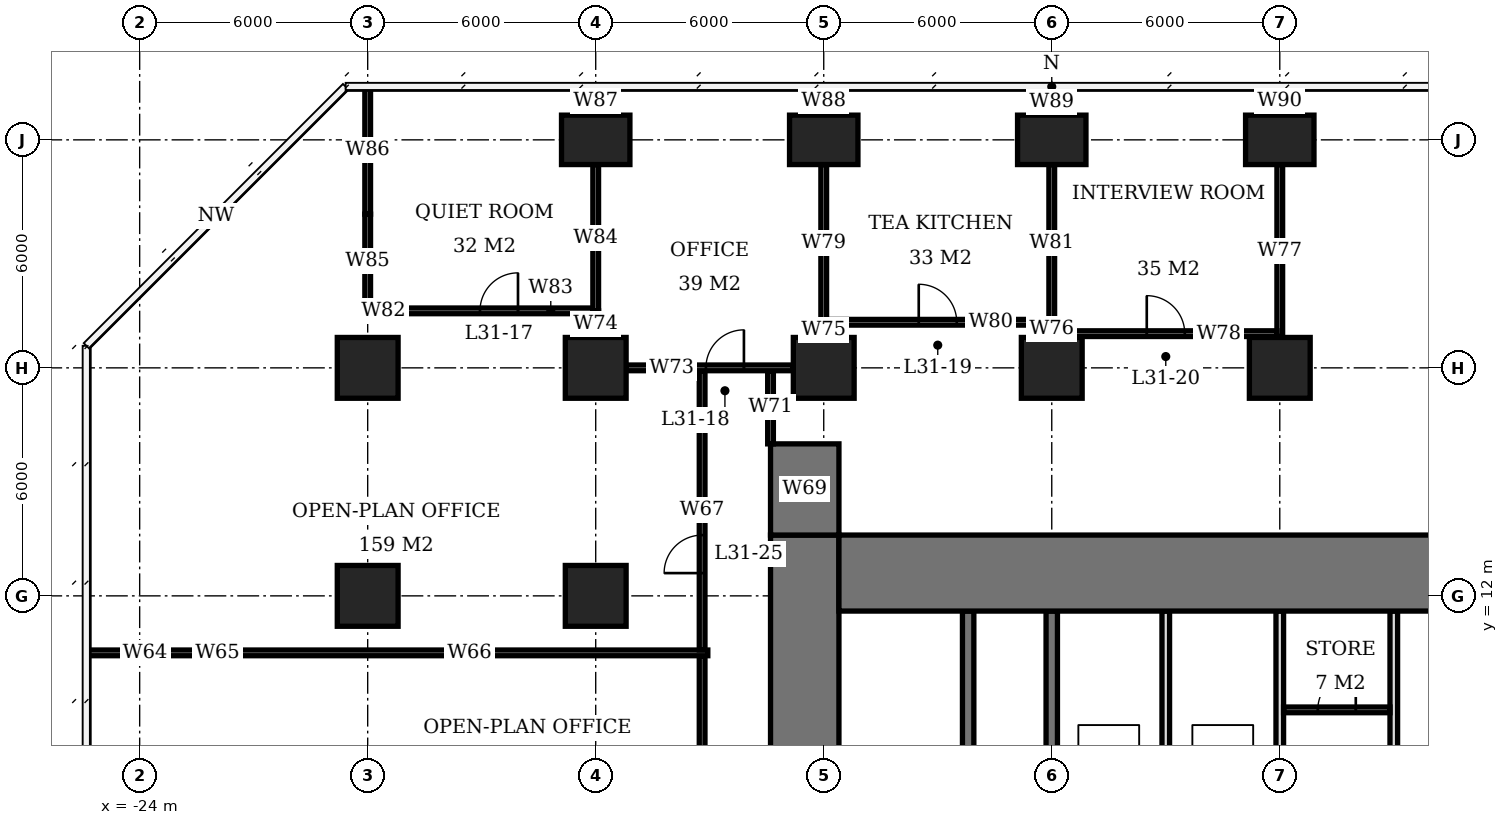
"""IFC4 building model, lengths in metres.
Left out: names, types, materials, properties, quantities, classifications, styles, units other than length and angle.
Written with IfcOpenShell. Run it as: python <this file> out.ifc"""

import sys

from ifc_helpers import new_model, si_unit, direction, frame, frame_2d, origin, origin_2d, place, context, subcontext, project, spatial, rectangle, extrude, element, fill, save


model = new_model("IFC4")
c1 = context("Model", 3, precision=1e-05, world=origin(), true_north=direction((0.0, 1.0)))
c2 = subcontext(c1, "Body", "Model", "MODEL_VIEW")
j1 = project(units=[si_unit("LENGTHUNIT", "METRE"), si_unit("PLANEANGLEUNIT", "RADIAN")], contexts=[c1])
p1 = place(None, origin())
s1 = spatial("IfcSite", under=j1, at=p1, CompositionType="ELEMENT")
p2 = place(p1, origin())
s2 = spatial("IfcBuilding", under=s1, at=p2, CompositionType="ELEMENT")
p3 = place(p2, frame((0.0, 0.0, 128.9)))
s3 = spatial("IfcBuildingStorey", under=s2, at=p3, CompositionType="ELEMENT", Elevation=128.9)
for number, where, z_axis, x_axis in (
    (1, (-18.0, 12.0, 0.0), (0.0, 0.0, 1.0), (1.0, 0.0, 0.0)),
    (2, (-18.0, 18.0, 0.0), (0.0, 0.0, 1.0), (1.0, 0.0, 0.0)),
    (3, (-12.0, 12.0, 0.0), (0.0, 0.0, 1.0), (1.0, 0.0, 0.0)),
    (4, (-12.0, 18.0, 0.0), (0.0, 0.0, 1.0), (1.0, 0.0, 0.0)),
):
    element("IfcColumn", number, at=place(p3, frame(where, z_axis=z_axis, x_axis=x_axis)), inside=s3, PredefinedType="COLUMN", context=c2, shape_type="SweptSolid", body=[
        extrude(rectangle(XDim=1.6, YDim=1.6, at=origin_2d()), origin(), (0.0, 0.0, 1.0), 3.9),
    ])
p4 = place(p3, frame((-12.0, 24.0, 0.0), z_axis=(0.0, 0.0, 1.0), x_axis=(1.0, 0.0, 0.0)))
e5 = element("IfcColumn", 5, at=p4, inside=s3, PredefinedType="COLUMN", context=c2, shape_type="SweptSolid", body=[
    extrude(rectangle(XDim=1.8, YDim=1.3, at=origin_2d()), origin(), (0.0, 0.0, 1.0), 3.9),
])
p5 = place(p3, frame((-6.0, 18.0, 0.0), z_axis=(0.0, 0.0, 1.0), x_axis=(1.0, 0.0, 0.0)))
e6 = element("IfcColumn", 6, at=p5, inside=s3, PredefinedType="COLUMN", context=c2, shape_type="SweptSolid", body=[
    extrude(rectangle(XDim=1.6, YDim=1.6, at=origin_2d()), origin(), (0.0, 0.0, 1.0), 3.9),
])
p6 = place(p3, frame((-6.0, 24.0, 0.0), z_axis=(0.0, 0.0, 1.0), x_axis=(1.0, 0.0, 0.0)))
e7 = element("IfcColumn", 7, at=p6, inside=s3, PredefinedType="COLUMN", context=c2, shape_type="SweptSolid", body=[
    extrude(rectangle(XDim=1.8, YDim=1.3, at=origin_2d()), origin(), (0.0, 0.0, 1.0), 3.9),
])
p7 = place(p3, frame((0.0, 18.0, 0.0), z_axis=(0.0, 0.0, 1.0), x_axis=(1.0, 0.0, 0.0)))
e8 = element("IfcColumn", 8, at=p7, inside=s3, PredefinedType="COLUMN", context=c2, shape_type="SweptSolid", body=[
    extrude(rectangle(XDim=1.6, YDim=1.6, at=origin_2d()), origin(), (0.0, 0.0, 1.0), 3.9),
])
p8 = place(p3, frame((0.0, 24.0, 0.0), z_axis=(0.0, 0.0, 1.0), x_axis=(1.0, 0.0, 0.0)))
e9 = element("IfcColumn", 9, at=p8, inside=s3, PredefinedType="COLUMN", context=c2, shape_type="SweptSolid", body=[
    extrude(rectangle(XDim=1.8, YDim=1.3, at=origin_2d()), origin(), (0.0, 0.0, 1.0), 3.9),
])
p9 = place(p3, frame((6.0, 18.0, 0.0), z_axis=(0.0, 0.0, 1.0), x_axis=(1.0, 0.0, 0.0)))
e10 = element("IfcColumn", 10, at=p9, inside=s3, PredefinedType="COLUMN", context=c2, shape_type="SweptSolid", body=[
    extrude(rectangle(XDim=1.6, YDim=1.6, at=origin_2d()), origin(), (0.0, 0.0, 1.0), 3.9),
])
p10 = place(p3, frame((6.0, 24.0, 0.0), z_axis=(0.0, 0.0, 1.0), x_axis=(1.0, 0.0, 0.0)))
e11 = element("IfcColumn", 11, at=p10, inside=s3, PredefinedType="COLUMN", context=c2, shape_type="SweptSolid", body=[
    extrude(rectangle(XDim=1.8, YDim=1.3, at=origin_2d()), origin(), (0.0, 0.0, 1.0), 3.9),
])
p11 = place(p3, frame((-5.6, 12.6, 0.0), z_axis=(0.0, 0.0, 1.0), x_axis=(1.0, 0.0, 0.0)))
e12 = element("IfcWall", 12, at=p11, inside=s3, PredefinedType="SHEAR", context=c2, shape_type="SweptSolid", body=[
    extrude(rectangle(XDim=23.2, YDim=2.0, at=frame_2d((11.6, 0.0))), origin(), (0.0, 0.0, 1.0), 3.9),
])
p12 = place(p3, frame((-6.5, -7.6, 0.0), z_axis=(0.0, 0.0, 1.0), x_axis=(0.0, 1.0, 0.0)))
e13 = element("IfcWall", 13, at=p12, inside=s3, PredefinedType="SHEAR", context=c2, shape_type="SweptSolid", body=[
    extrude(rectangle(XDim=21.2, YDim=1.8, at=frame_2d((10.6, 0.0))), origin(), (0.0, 0.0, 1.0), 3.9),
])
p13 = place(p12, frame((7.8, 0.0, 0.0)))
e14 = element("IfcOpeningElement", 14, at=p13, cuts=e13, PredefinedType="OPENING", context=c2, shape_type="SweptSolid", body=[
    extrude(rectangle(XDim=1.8, YDim=2.4, at=frame_2d((0.9, 1.2))), frame((0.0, 0.91, 0.0), z_axis=(0.0, -1.0, 0.0), x_axis=(1.0, 0.0, 0.0)), (0.0, 0.0, 1.0), 1.82),
])
p14 = place(p3, frame((-6.5, 13.6, 0.0), z_axis=(0.0, 0.0, 1.0), x_axis=(0.0, 1.0, 0.0)))
e15 = element("IfcWall", 15, at=p14, inside=s3, PredefinedType="SHEAR", context=c2, shape_type="SweptSolid", body=[
    extrude(rectangle(XDim=2.4, YDim=1.8, at=frame_2d((1.2, 0.0))), origin(), (0.0, 0.0, 1.0), 3.9),
])
for number, where, z_axis, x_axis in (
    (16, (0.0, 3.15, 0.0), (0.0, 0.0, 1.0), (0.0, 1.0, 0.0)),
    (17, (-2.2, 3.15, 0.0), (0.0, 0.0, 1.0), (0.0, 1.0, 0.0)),
):
    element("IfcWall", number, at=place(p3, frame(where, z_axis=z_axis, x_axis=x_axis)), inside=s3, PredefinedType="SHEAR", context=c2, shape_type="SweptSolid", body=[
        extrude(rectangle(XDim=8.45, YDim=0.3, at=frame_2d((4.225, 0.0))), origin(), (0.0, 0.0, 1.0), 3.9),
    ])
for number, where, z_axis, x_axis in (
    (18, (3.0, 6.15, 0.0), (0.0, 0.0, 1.0), (0.0, 1.0, 0.0)),
    (19, (6.0, 6.15, 0.0), (0.0, 0.0, 1.0), (0.0, 1.0, 0.0)),
    (20, (9.0, 6.15, 0.0), (0.0, 0.0, 1.0), (0.0, 1.0, 0.0)),
):
    element("IfcWall", number, at=place(p3, frame(where, z_axis=z_axis, x_axis=x_axis)), inside=s3, PredefinedType="SOLIDWALL", context=c2, shape_type="SweptSolid", body=[
        extrude(rectangle(XDim=5.45, YDim=0.2, at=frame_2d((2.725, 0.0))), origin(), (0.0, 0.0, 1.0), 3.9),
    ])
p15 = place(p3, frame((6.1, 9.0, 0.0), z_axis=(0.0, 0.0, 1.0), x_axis=(1.0, 0.0, 0.0)))
e21 = element("IfcWall", 21, at=p15, inside=s3, PredefinedType="PARTITIONING", context=c2, shape_type="SweptSolid", body=[
    extrude(rectangle(XDim=2.8, YDim=0.15, at=frame_2d((1.4, 0.0))), origin(), (0.0, 0.0, 1.0), 3.65),
])
p16 = place(p15, frame((0.9, 0.0, 0.0)))
e22 = element("IfcOpeningElement", 22, at=p16, cuts=e21, PredefinedType="OPENING", context=c2, shape_type="SweptSolid", body=[
    extrude(rectangle(XDim=1.0, YDim=2.1, at=frame_2d((0.5, 1.05))), frame((0.0, 0.085, 0.0), z_axis=(0.0, -1.0, 0.0), x_axis=(1.0, 0.0, 0.0)), (0.0, 0.0, 1.0), 0.17),
])
p17 = place(p3, frame((-11.2, 18.0, 0.0), z_axis=(0.0, 0.0, 1.0), x_axis=(1.0, 0.0, 0.0)))
e23 = element("IfcWall", 23, at=p17, inside=s3, PredefinedType="PARTITIONING", context=c2, shape_type="SweptSolid", body=[
    extrude(rectangle(XDim=4.4, YDim=0.15, at=frame_2d((2.2, 0.0))), origin(), (0.0, 0.0, 1.0), 3.65),
])
p18 = place(p17, frame((2.1, 0.0, 0.0)))
e24 = element("IfcOpeningElement", 24, at=p18, cuts=e23, PredefinedType="OPENING", context=c2, shape_type="SweptSolid", body=[
    extrude(rectangle(XDim=1.0, YDim=2.1, at=frame_2d((0.5, 1.05))), frame((0.0, 0.085, 0.0), z_axis=(0.0, -1.0, 0.0), x_axis=(1.0, 0.0, 0.0)), (0.0, 0.0, 1.0), 0.17),
])
p19 = place(p3, frame((0.075, 18.9, 0.0), z_axis=(0.0, 0.0, 1.0), x_axis=(1.0, 0.0, 0.0)))
e25 = element("IfcWall", 25, at=p19, inside=s3, PredefinedType="PARTITIONING", context=c2, shape_type="SweptSolid", body=[
    extrude(rectangle(XDim=5.85, YDim=0.15, at=frame_2d((2.925, 0.0))), origin(), (0.0, 0.0, 1.0), 3.65),
])
p20 = place(p19, frame((2.425, 0.0, 0.0)))
e26 = element("IfcOpeningElement", 26, at=p20, cuts=e25, PredefinedType="OPENING", context=c2, shape_type="SweptSolid", body=[
    extrude(rectangle(XDim=1.0, YDim=2.1, at=frame_2d((0.5, 1.05))), frame((0.0, 0.085, 0.0), z_axis=(0.0, -1.0, 0.0), x_axis=(1.0, 0.0, 0.0)), (0.0, 0.0, 1.0), 0.17),
])
p21 = place(p3, frame((-5.925, 19.2, 0.0), z_axis=(0.0, 0.0, 1.0), x_axis=(1.0, 0.0, 0.0)))
e27 = element("IfcWall", 27, at=p21, inside=s3, PredefinedType="PARTITIONING", context=c2, shape_type="SweptSolid", body=[
    extrude(rectangle(XDim=5.85, YDim=0.15, at=frame_2d((2.925, 0.0))), origin(), (0.0, 0.0, 1.0), 3.65),
])
p22 = place(p21, frame((2.425, 0.0, 0.0)))
e28 = element("IfcOpeningElement", 28, at=p22, cuts=e27, PredefinedType="OPENING", context=c2, shape_type="SweptSolid", body=[
    extrude(rectangle(XDim=1.0, YDim=2.1, at=frame_2d((0.5, 1.05))), frame((0.0, 0.085, 0.0), z_axis=(0.0, -1.0, 0.0), x_axis=(1.0, 0.0, 0.0)), (0.0, 0.0, 1.0), 0.17),
])
p23 = place(p3, frame((-18.075, 19.5, 0.0), z_axis=(0.0, 0.0, 1.0), x_axis=(1.0, 0.0, 0.0)))
e29 = element("IfcWall", 29, at=p23, inside=s3, PredefinedType="PARTITIONING", context=c2, shape_type="SweptSolid", body=[
    extrude(rectangle(XDim=0.985, YDim=0.15, at=frame_2d((0.492, 0.0))), origin(), (0.0, 0.0, 1.0), 2.65),
])
p24 = place(p3, frame((-17.09, 19.5, 0.0), z_axis=(0.0, 0.0, 1.0), x_axis=(1.0, 0.0, 0.0)))
e30 = element("IfcWall", 30, at=p24, inside=s3, PredefinedType="PARTITIONING", context=c2, shape_type="SweptSolid", body=[
    extrude(rectangle(XDim=5.015, YDim=0.15, at=frame_2d((2.508, 0.0))), origin(), (0.0, 0.0, 1.0), 3.65),
])
p25 = place(p24, frame((2.045, 0.0, 0.0)))
e31 = element("IfcOpeningElement", 31, at=p25, cuts=e30, PredefinedType="OPENING", context=c2, shape_type="SweptSolid", body=[
    extrude(rectangle(XDim=1.0, YDim=2.1, at=frame_2d((0.5, 1.05))), frame((0.0, 0.085, 0.0), z_axis=(0.0, -1.0, 0.0), x_axis=(1.0, 0.0, 0.0)), (0.0, 0.0, 1.0), 0.17),
])
p26 = place(p3, frame((-18.0, 19.575, 0.0), z_axis=(0.0, 0.0, 1.0), x_axis=(0.0, 1.0, 0.0)))
e32 = element("IfcWall", 32, at=p26, inside=s3, PredefinedType="PARTITIONING", context=c2, shape_type="SweptSolid", body=[
    extrude(rectangle(XDim=2.47, YDim=0.15, at=frame_2d((1.235, 0.0))), origin(), (0.0, 0.0, 1.0), 2.65),
])
p27 = place(p3, frame((-18.0, 22.045, 0.0), z_axis=(0.0, 0.0, 1.0), x_axis=(0.0, 1.0, 0.0)))
e33 = element("IfcWall", 33, at=p27, inside=s3, PredefinedType="PARTITIONING", context=c2, shape_type="SweptSolid", body=[
    extrude(rectangle(XDim=3.355, YDim=0.15, at=frame_2d((1.677, 0.0))), origin(), (0.0, 0.0, 1.0), 3.65),
])
p28 = place(p3, frame((-12.0, 18.8, 0.0), z_axis=(0.0, 0.0, 1.0), x_axis=(0.0, 1.0, 0.0)))
e34 = element("IfcWall", 34, at=p28, inside=s3, PredefinedType="PARTITIONING", context=c2, shape_type="SweptSolid", body=[
    extrude(rectangle(XDim=0.7, YDim=0.15, at=frame_2d((0.35, 0.0))), origin(), (0.0, 0.0, 1.0), 3.65),
])
p29 = place(p3, frame((-12.0, 19.5, 0.0), z_axis=(0.0, 0.0, 1.0), x_axis=(0.0, 1.0, 0.0)))
e35 = element("IfcWall", 35, at=p29, inside=s3, PredefinedType="PARTITIONING", context=c2, shape_type="SweptSolid", body=[
    extrude(rectangle(XDim=3.85, YDim=0.15, at=frame_2d((1.925, 0.0))), origin(), (0.0, 0.0, 1.0), 3.65),
])
p30 = place(p3, frame((-12.0, 24.65, 0.0), z_axis=(0.0, 0.0, 1.0), x_axis=(0.0, 1.0, 0.0)))
e36 = element("IfcWall", 36, at=p30, inside=s3, PredefinedType="PARTITIONING", context=c2, shape_type="SweptSolid", body=[
    extrude(rectangle(XDim=0.75, YDim=0.15, at=frame_2d((0.375, 0.0))), origin(), (0.0, 0.0, 1.0), 3.65),
])
p31 = place(p3, frame((-6.0, 18.8, 0.0), z_axis=(0.0, 0.0, 1.0), x_axis=(0.0, 1.0, 0.0)))
e37 = element("IfcWall", 37, at=p31, inside=s3, PredefinedType="PARTITIONING", context=c2, shape_type="SweptSolid", body=[
    extrude(rectangle(XDim=0.4, YDim=0.15, at=frame_2d((0.2, 0.0))), origin(), (0.0, 0.0, 1.0), 3.65),
])
p32 = place(p3, frame((-6.0, 19.2, 0.0), z_axis=(0.0, 0.0, 1.0), x_axis=(0.0, 1.0, 0.0)))
e38 = element("IfcWall", 38, at=p32, inside=s3, PredefinedType="PARTITIONING", context=c2, shape_type="SweptSolid", body=[
    extrude(rectangle(XDim=4.15, YDim=0.15, at=frame_2d((2.075, 0.0))), origin(), (0.0, 0.0, 1.0), 3.65),
])
p33 = place(p3, frame((-6.0, 24.65, 0.0), z_axis=(0.0, 0.0, 1.0), x_axis=(0.0, 1.0, 0.0)))
e39 = element("IfcWall", 39, at=p33, inside=s3, PredefinedType="PARTITIONING", context=c2, shape_type="SweptSolid", body=[
    extrude(rectangle(XDim=0.75, YDim=0.15, at=frame_2d((0.375, 0.0))), origin(), (0.0, 0.0, 1.0), 3.65),
])
p34 = place(p3, frame((0.0, 18.825, 0.0), z_axis=(0.0, 0.0, 1.0), x_axis=(0.0, 1.0, 0.0)))
e40 = element("IfcWall", 40, at=p34, inside=s3, PredefinedType="PARTITIONING", context=c2, shape_type="SweptSolid", body=[
    extrude(rectangle(XDim=0.375, YDim=0.15, at=frame_2d((0.188, 0.0))), origin(), (0.0, 0.0, 1.0), 3.65),
])
p35 = place(p3, frame((0.0, 19.2, 0.0), z_axis=(0.0, 0.0, 1.0), x_axis=(0.0, 1.0, 0.0)))
e41 = element("IfcWall", 41, at=p35, inside=s3, PredefinedType="PARTITIONING", context=c2, shape_type="SweptSolid", body=[
    extrude(rectangle(XDim=4.15, YDim=0.15, at=frame_2d((2.075, 0.0))), origin(), (0.0, 0.0, 1.0), 3.65),
])
p36 = place(p3, frame((0.0, 24.65, 0.0), z_axis=(0.0, 0.0, 1.0), x_axis=(0.0, 1.0, 0.0)))
e42 = element("IfcWall", 42, at=p36, inside=s3, PredefinedType="PARTITIONING", context=c2, shape_type="SweptSolid", body=[
    extrude(rectangle(XDim=0.7, YDim=0.15, at=frame_2d((0.35, 0.0))), origin(), (0.0, 0.0, 1.0), 3.65),
])
p37 = place(p3, frame((6.0, 18.825, 0.0), z_axis=(0.0, 0.0, 1.0), x_axis=(0.0, 1.0, 0.0)))
e43 = element("IfcWall", 43, at=p37, inside=s3, PredefinedType="PARTITIONING", context=c2, shape_type="SweptSolid", body=[
    extrude(rectangle(XDim=4.525, YDim=0.15, at=frame_2d((2.263, 0.0))), origin(), (0.0, 0.0, 1.0), 3.65),
])
p38 = place(p3, frame((6.0, 24.65, 0.0), z_axis=(0.0, 0.0, 1.0), x_axis=(0.0, 1.0, 0.0)))
e44 = element("IfcWall", 44, at=p38, inside=s3, PredefinedType="PARTITIONING", context=c2, shape_type="SweptSolid", body=[
    extrude(rectangle(XDim=0.75, YDim=0.15, at=frame_2d((0.375, 0.0))), origin(), (0.0, 0.0, 1.0), 3.65),
])
p39 = place(p3, frame((-25.4, 10.5, 0.0), z_axis=(0.0, 0.0, 1.0), x_axis=(1.0, 0.0, 0.0)))
e45 = element("IfcWall", 45, at=p39, inside=s3, PredefinedType="PARTITIONING", context=c2, shape_type="SweptSolid", body=[
    extrude(rectangle(XDim=3.09, YDim=0.15, at=frame_2d((1.545, 0.0))), origin(), (0.0, 0.0, 1.0), 3.65),
])
p40 = place(p3, frame((-22.31, 10.5, 0.0), z_axis=(0.0, 0.0, 1.0), x_axis=(1.0, 0.0, 0.0)))
e46 = element("IfcWall", 46, at=p40, inside=s3, PredefinedType="PARTITIONING", context=c2, shape_type="SweptSolid", body=[
    extrude(rectangle(XDim=0.72, YDim=0.15, at=frame_2d((0.36, 0.0))), origin(), (0.0, 0.0, 1.0), 2.65),
])
p41 = place(p3, frame((-21.59, 10.5, 0.0), z_axis=(0.0, 0.0, 1.0), x_axis=(1.0, 0.0, 0.0)))
e47 = element("IfcWall", 47, at=p41, inside=s3, PredefinedType="PARTITIONING", context=c2, shape_type="SweptSolid", body=[
    extrude(rectangle(XDim=12.54, YDim=0.15, at=frame_2d((6.27, 0.0))), origin(), (0.0, 0.0, 1.0), 3.65),
])
p42 = place(p3, frame((-9.2, -0.9, 0.0), z_axis=(0.0, 0.0, 1.0), x_axis=(0.0, 1.0, 0.0)))
e48 = element("IfcWall", 48, at=p42, inside=s3, PredefinedType="PARTITIONING", context=c2, shape_type="SweptSolid", body=[
    extrude(rectangle(XDim=11.325, YDim=0.15, at=frame_2d((5.663, 0.0))), origin(), (0.0, 0.0, 1.0), 3.65),
])
p43 = place(p42, frame((3.441, 0.0, 0.0)))
e49 = element("IfcOpeningElement", 49, at=p43, cuts=e48, PredefinedType="OPENING", context=c2, shape_type="SweptSolid", body=[
    extrude(rectangle(XDim=1.0, YDim=2.1, at=frame_2d((0.5, 1.05))), frame((0.0, 0.085, 0.0), z_axis=(0.0, -1.0, 0.0), x_axis=(1.0, 0.0, 0.0)), (0.0, 0.0, 1.0), 0.17),
])
p44 = place(p3, frame((-9.2, 10.575, 0.0), z_axis=(0.0, 0.0, 1.0), x_axis=(0.0, 1.0, 0.0)))
e50 = element("IfcWall", 50, at=p44, inside=s3, PredefinedType="PARTITIONING", context=c2, shape_type="SweptSolid", body=[
    extrude(rectangle(XDim=7.35, YDim=0.15, at=frame_2d((3.675, 0.0))), origin(), (0.0, 0.0, 1.0), 3.65),
])
p45 = place(p44, frame((2.024, 0.0, 0.0)))
e51 = element("IfcOpeningElement", 51, at=p45, cuts=e50, PredefinedType="OPENING", context=c2, shape_type="SweptSolid", body=[
    extrude(rectangle(XDim=1.0, YDim=2.1, at=frame_2d((0.5, 1.05))), frame((0.0, 0.085, 0.0), z_axis=(0.0, -1.0, 0.0), x_axis=(1.0, 0.0, 0.0)), (0.0, 0.0, 1.0), 0.17),
])
p46 = place(p3, frame((-7.4, 16.0, 0.0), z_axis=(0.0, 0.0, 1.0), x_axis=(0.0, 1.0, 0.0)))
e52 = element("IfcWall", 52, at=p46, inside=s3, PredefinedType="PARTITIONING", context=c2, shape_type="SweptSolid", body=[
    extrude(rectangle(XDim=1.925, YDim=0.15, at=frame_2d((0.962, 0.0))), origin(), (0.0, 0.0, 1.0), 3.65),
])
p47 = place(p16, origin())
e53 = element("IfcDoor", 53, at=p47, inside=s3, OperationType="SINGLE_SWING_RIGHT", PredefinedType="DOOR", context=c2, shape_type="SweptSolid", body=[
    extrude(rectangle(XDim=1.0, YDim=2.1, at=frame_2d((0.5, 1.05))), frame((0.0, 0.025, 0.0), z_axis=(0.0, -1.0, 0.0), x_axis=(1.0, 0.0, 0.0)), (0.0, 0.0, 1.0), 0.05),
])
fill(e22, e53)
p48 = place(p25, origin())
e54 = element("IfcDoor", 54, at=p48, inside=s3, OperationType="SINGLE_SWING_RIGHT", PredefinedType="DOOR", context=c2, shape_type="SweptSolid", body=[
    extrude(rectangle(XDim=1.0, YDim=2.1, at=frame_2d((0.5, 1.05))), frame((0.0, 0.025, 0.0), z_axis=(0.0, -1.0, 0.0), x_axis=(1.0, 0.0, 0.0)), (0.0, 0.0, 1.0), 0.05),
])
fill(e31, e54)
p49 = place(p18, origin())
e55 = element("IfcDoor", 55, at=p49, inside=s3, OperationType="SINGLE_SWING_RIGHT", PredefinedType="DOOR", context=c2, shape_type="SweptSolid", body=[
    extrude(rectangle(XDim=1.0, YDim=2.1, at=frame_2d((0.5, 1.05))), frame((0.0, 0.025, 0.0), z_axis=(0.0, -1.0, 0.0), x_axis=(1.0, 0.0, 0.0)), (0.0, 0.0, 1.0), 0.05),
])
fill(e24, e55)
p50 = place(p22, origin())
e56 = element("IfcDoor", 56, at=p50, inside=s3, OperationType="SINGLE_SWING_LEFT", PredefinedType="DOOR", context=c2, shape_type="SweptSolid", body=[
    extrude(rectangle(XDim=1.0, YDim=2.1, at=frame_2d((0.5, 1.05))), frame((0.0, 0.025, 0.0), z_axis=(0.0, -1.0, 0.0), x_axis=(1.0, 0.0, 0.0)), (0.0, 0.0, 1.0), 0.05),
])
fill(e28, e56)
p51 = place(p20, origin())
e57 = element("IfcDoor", 57, at=p51, inside=s3, OperationType="SINGLE_SWING_LEFT", PredefinedType="DOOR", context=c2, shape_type="SweptSolid", body=[
    extrude(rectangle(XDim=1.0, YDim=2.1, at=frame_2d((0.5, 1.05))), frame((0.0, 0.025, 0.0), z_axis=(0.0, -1.0, 0.0), x_axis=(1.0, 0.0, 0.0)), (0.0, 0.0, 1.0), 0.05),
])
fill(e26, e57)
p52 = place(p45, origin())
e58 = element("IfcDoor", 58, at=p52, inside=s3, OperationType="SINGLE_SWING_LEFT", PredefinedType="DOOR", context=c2, shape_type="SweptSolid", body=[
    extrude(rectangle(XDim=1.0, YDim=2.1, at=frame_2d((0.5, 1.05))), frame((0.0, 0.025, 0.0), z_axis=(0.0, -1.0, 0.0), x_axis=(1.0, 0.0, 0.0)), (0.0, 0.0, 1.0), 0.05),
])
fill(e51, e58)
save(model, sys.argv[1])
